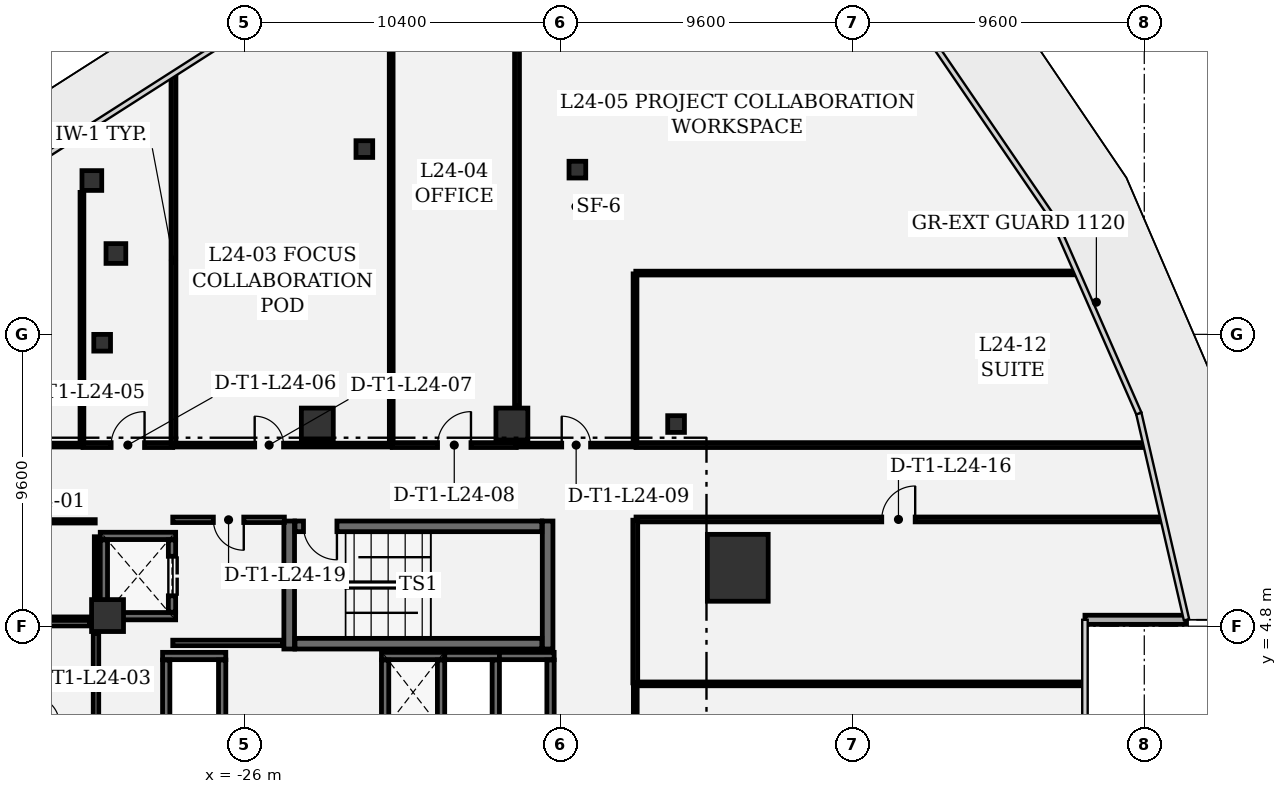
"""IFC4 building model, lengths in metres.
Left out: names, types, materials, properties, quantities, classifications, styles, units other than length and angle.
Written with IfcOpenShell. Run it as: python <this file> out.ifc"""

import sys

from ifc_helpers import new_model, si_unit, direction, frame, frame_2d, origin, origin_2d, place, context, subcontext, project, spatial, rectangle, extrude, element, fill, save


model = new_model("IFC4")
c1 = context("Model", 3, precision=1e-05, world=origin(), true_north=direction((0.0, 1.0)))
c2 = subcontext(c1, "Body", "Model", "MODEL_VIEW")
j1 = project(units=[si_unit("LENGTHUNIT", "METRE"), si_unit("PLANEANGLEUNIT", "RADIAN")], contexts=[c1])
p1 = place(None, origin())
s1 = spatial("IfcSite", under=j1, at=p1, CompositionType="ELEMENT")
p2 = place(p1, origin())
s2 = spatial("IfcBuilding", under=s1, at=p2, CompositionType="ELEMENT")
p3 = place(p2, frame((0.0, 0.0, 109.8)))
s3 = spatial("IfcBuildingStorey", under=s2, at=p3, CompositionType="ELEMENT", Elevation=109.8)
p4 = place(p3, frame((-9.77, 6.721, 0.0), z_axis=(0.0, 0.0, 1.0), x_axis=(1.0, 0.0, 0.0)))
e1 = element("IfcColumn", 1, at=p4, inside=s3, PredefinedType="COLUMN", context=c2, shape_type="SweptSolid", body=[
    extrude(rectangle(XDim=2.0, YDim=2.2, at=origin_2d()), origin(), (0.0, 0.0, 1.0), 4.05),
])
for number, where, z_axis, x_axis in (
    (2, (-23.6, 11.45, 0.0), (0.0, 0.0, 1.0), (1.0, 0.0, 0.0)),
    (3, (-17.2, 11.45, 0.0), (0.0, 0.0, 1.0), (1.0, 0.0, 0.0)),
    (4, (-30.5, 5.15, 0.0), (0.0, 0.0, 1.0), (1.0, 0.0, 0.0)),
):
    element("IfcColumn", number, at=place(p3, frame(where, z_axis=z_axis, x_axis=x_axis)), inside=s3, PredefinedType="COLUMN", context=c2, shape_type="SweptSolid", body=[
        extrude(rectangle(XDim=1.05, YDim=1.05, at=origin_2d()), origin(), (0.0, 0.0, 1.0), 4.05),
    ])
for number, where, z_axis, x_axis in (
    (5, (-31.016, 19.46, 0.0), (0.0, 0.0, 1.0), (1.0, 0.0, 0.0)),
    (6, (-30.225, 17.06, 0.0), (0.0, 0.0, 1.0), (1.0, 0.0, 0.0)),
):
    element("IfcColumn", number, at=place(p3, frame(where, z_axis=z_axis, x_axis=x_axis)), inside=s3, PredefinedType="COLUMN", context=c2, shape_type="SweptSolid", body=[
        extrude(rectangle(XDim=0.65, YDim=0.65, at=origin_2d()), origin(), (0.0, 0.0, 1.0), 4.05),
    ])
for number, where, z_axis, x_axis in (
    (7, (-22.053, 20.495, 0.0), (0.0, 0.0, 1.0), (1.0, 0.0, 0.0)),
    (8, (-30.677, 14.124, 0.0), (0.0, 0.0, 1.0), (1.0, 0.0, 0.0)),
    (9, (-15.046, 19.818, 0.0), (0.0, 0.0, 1.0), (1.0, 0.0, 0.0)),
    (10, (-11.8, 11.45, 0.0), (0.0, 0.0, 1.0), (1.0, 0.0, 0.0)),
):
    element("IfcColumn", number, at=place(p3, frame(where, z_axis=z_axis, x_axis=x_axis)), inside=s3, PredefinedType="COLUMN", context=c2, shape_type="SweptSolid", body=[
        extrude(rectangle(XDim=0.55, YDim=0.55, at=origin_2d()), origin(), (0.0, 0.0, 1.0), 4.05),
    ])
p5 = place(p3, frame((1.649, 5.011, 0.0), z_axis=(0.0, 0.0, 1.0), x_axis=(1.0, 0.0, 0.0)))
e11 = element("IfcWall", 11, at=p5, inside=s3, PredefinedType="SOLIDWALL", context=c2, shape_type="SweptSolid", body=[
    extrude(rectangle(XDim=3.341, YDim=0.3, at=frame_2d((1.67, 0.0))), origin(), (0.0, 0.0, 1.0), 3.77),
])
for number, where, z_axis, x_axis in (
    (12, (-24.525, 8.26, 0.0), (0.0, 0.0, 1.0), (0.0, -1.0, 0.0)),
    (13, (-16.025, 4.05, 0.0), (0.0, 0.0, 1.0), (0.0, 1.0, 0.0)),
):
    element("IfcWall", number, at=place(p3, frame(where, z_axis=z_axis, x_axis=x_axis)), inside=s3, PredefinedType="SHEAR", context=c2, shape_type="SweptSolid", body=[
        extrude(rectangle(XDim=4.21, YDim=0.35, at=frame_2d((2.105, 0.0))), origin(), (0.0, 0.0, 1.0), 3.77),
    ])
p6 = place(p3, frame((-24.335, 4.225, 0.0), z_axis=(0.0, 0.0, 1.0), x_axis=(1.0, 0.0, 0.0)))
e14 = element("IfcWall", 14, at=p6, inside=s3, PredefinedType="SHEAR", context=c2, shape_type="SweptSolid", body=[
    extrude(rectangle(XDim=8.12, YDim=0.35, at=frame_2d((4.06, 0.0))), origin(), (0.0, 0.0, 1.0), 3.77),
])
p7 = place(p3, frame((-16.215, 8.085, 0.0), z_axis=(0.0, 0.0, 1.0), x_axis=(-1.0, 0.0, 0.0)))
e15 = element("IfcWall", 15, at=p7, inside=s3, PredefinedType="SHEAR", context=c2, shape_type="SweptSolid", body=[
    extrude(rectangle(XDim=8.12, YDim=0.35, at=frame_2d((4.06, 0.0))), origin(), (0.0, 0.0, 1.0), 3.77),
])
p8 = place(p7, frame((6.74, 0.0, 0.0)))
e16 = element("IfcOpeningElement", 16, at=p8, cuts=e15, PredefinedType="OPENING", context=c2, shape_type="SweptSolid", body=[
    extrude(rectangle(XDim=1.1, YDim=2.2, at=frame_2d((0.55, 1.1))), frame((0.0, 0.185, 0.0), z_axis=(0.0, -1.0, 0.0), x_axis=(1.0, 0.0, 0.0)), (0.0, 0.0, 1.0), 0.37),
])
for number, where, z_axis, x_axis in (
    (17, (-28.26, 5.13, 0.0), (0.0, 0.0, 1.0), (-1.0, 0.0, 0.0)),
    (18, (-30.74, 7.77, 0.0), (0.0, 0.0, 1.0), (1.0, 0.0, 0.0)),
):
    element("IfcWall", number, at=place(p3, frame(where, z_axis=z_axis, x_axis=x_axis)), inside=s3, PredefinedType="SHEAR", context=c2, shape_type="SweptSolid", body=[
        extrude(rectangle(XDim=2.48, YDim=0.24, at=frame_2d((1.24, 0.0))), origin(), (0.0, 0.0, 1.0), 3.77),
    ])
p9 = place(p3, frame((-30.62, 5.262, 0.0), z_axis=(0.0, 0.0, 1.0), x_axis=(0.0, 1.0, 0.0)))
e19 = element("IfcWall", 19, at=p9, inside=s3, PredefinedType="SHEAR", context=c2, shape_type="SweptSolid", body=[
    extrude(rectangle(XDim=2.376, YDim=0.24, at=frame_2d((1.188, 0.0))), origin(), (0.0, 0.0, 1.0), 3.77),
])
p10 = place(p3, frame((-28.38, 7.638, 0.0), z_axis=(0.0, 0.0, 1.0), x_axis=(0.0, -1.0, 0.0)))
e20 = element("IfcWall", 20, at=p10, inside=s3, PredefinedType="SHEAR", context=c2, shape_type="SweptSolid", body=[
    extrude(rectangle(XDim=2.376, YDim=0.24, at=frame_2d((1.188, 0.0))), origin(), (0.0, 0.0, 1.0), 3.77),
])
p11 = place(p10, frame((0.538, 0.0, 0.0)))
e21 = element("IfcOpeningElement", 21, at=p11, cuts=e20, PredefinedType="OPENING", context=c2, shape_type="SweptSolid", body=[
    extrude(rectangle(XDim=1.3, YDim=2.3, at=frame_2d((0.65, 1.15))), frame((0.0, 0.13, 0.0), z_axis=(0.0, -1.0, 0.0), x_axis=(1.0, 0.0, 0.0)), (0.0, 0.0, 1.0), 0.26),
])
p12 = place(p3, frame((-28.69, 3.82, 0.0), z_axis=(0.0, 0.0, 1.0), x_axis=(1.0, 0.0, 0.0)))
e22 = element("IfcWall", 22, at=p12, inside=s3, PredefinedType="SHEAR", context=c2, shape_type="SweptSolid", body=[
    extrude(rectangle(XDim=2.08, YDim=0.24, at=frame_2d((1.04, 0.0))), origin(), (0.0, 0.0, 1.0), 3.77),
])
for number, where, z_axis, x_axis in (
    (23, (-28.57, 1.562, 0.0), (0.0, 0.0, 1.0), (0.0, 1.0, 0.0)),
    (24, (-26.73, 3.688, 0.0), (0.0, 0.0, 1.0), (0.0, -1.0, 0.0)),
):
    element("IfcWall", number, at=place(p3, frame(where, z_axis=z_axis, x_axis=x_axis)), inside=s3, PredefinedType="SHEAR", context=c2, shape_type="SweptSolid", body=[
        extrude(rectangle(XDim=2.126, YDim=0.24, at=frame_2d((1.063, 0.0))), origin(), (0.0, 0.0, 1.0), 3.77),
    ])
p13 = place(p3, frame((-21.49, 3.82, 0.0), z_axis=(0.0, 0.0, 1.0), x_axis=(1.0, 0.0, 0.0)))
e25 = element("IfcWall", 25, at=p13, inside=s3, PredefinedType="SHEAR", context=c2, shape_type="SweptSolid", body=[
    extrude(rectangle(XDim=2.08, YDim=0.24, at=frame_2d((1.04, 0.0))), origin(), (0.0, 0.0, 1.0), 3.77),
])
for number, where, z_axis, x_axis in (
    (26, (-21.37, 1.562, 0.0), (0.0, 0.0, 1.0), (0.0, 1.0, 0.0)),
    (27, (-19.53, 3.688, 0.0), (0.0, 0.0, 1.0), (0.0, -1.0, 0.0)),
):
    element("IfcWall", number, at=place(p3, frame(where, z_axis=z_axis, x_axis=x_axis)), inside=s3, PredefinedType="SHEAR", context=c2, shape_type="SweptSolid", body=[
        extrude(rectangle(XDim=2.126, YDim=0.24, at=frame_2d((1.063, 0.0))), origin(), (0.0, 0.0, 1.0), 3.77),
    ])
p14 = place(p3, frame((-19.41, 3.82, 0.0), z_axis=(0.0, 0.0, 1.0), x_axis=(1.0, 0.0, 0.0)))
e28 = element("IfcWall", 28, at=p14, inside=s3, PredefinedType="SHEAR", context=c2, shape_type="SweptSolid", body=[
    extrude(rectangle(XDim=1.8, YDim=0.24, at=frame_2d((0.9, 0.0))), origin(), (0.0, 0.0, 1.0), 3.77),
])
p15 = place(p3, frame((-17.73, 3.688, 0.0), z_axis=(0.0, 0.0, 1.0), x_axis=(0.0, -1.0, 0.0)))
e29 = element("IfcWall", 29, at=p15, inside=s3, PredefinedType="SHEAR", context=c2, shape_type="SweptSolid", body=[
    extrude(rectangle(XDim=2.126, YDim=0.24, at=frame_2d((1.063, 0.0))), origin(), (0.0, 0.0, 1.0), 3.77),
])
p16 = place(p3, frame((-17.61, 3.82, 0.0), z_axis=(0.0, 0.0, 1.0), x_axis=(1.0, 0.0, 0.0)))
e30 = element("IfcWall", 30, at=p16, inside=s3, PredefinedType="SHEAR", context=c2, shape_type="SweptSolid", body=[
    extrude(rectangle(XDim=1.8, YDim=0.24, at=frame_2d((0.9, 0.0))), origin(), (0.0, 0.0, 1.0), 3.77),
])
p17 = place(p3, frame((-15.93, 3.688, 0.0), z_axis=(0.0, 0.0, 1.0), x_axis=(0.0, -1.0, 0.0)))
e31 = element("IfcWall", 31, at=p17, inside=s3, PredefinedType="SHEAR", context=c2, shape_type="SweptSolid", body=[
    extrude(rectangle(XDim=2.126, YDim=0.24, at=frame_2d((1.063, 0.0))), origin(), (0.0, 0.0, 1.0), 3.77),
])
p18 = place(p3, frame((-28.355, 4.25, 0.0), z_axis=(0.0, 0.0, 1.0), x_axis=(1.0, 0.0, 0.0)))
e32 = element("IfcWall", 32, at=p18, inside=s3, PredefinedType="PARTITIONING", context=c2, shape_type="SweptSolid", body=[
    extrude(rectangle(XDim=3.622, YDim=0.18, at=frame_2d((1.811, 0.0))), origin(), (0.0, 0.0, 1.0), 3.77),
])
p19 = place(p3, frame((-24.684, 8.3, 0.0), z_axis=(0.0, 0.0, 1.0), x_axis=(-1.0, 0.0, 0.0)))
e33 = element("IfcWall", 33, at=p19, inside=s3, PredefinedType="PARTITIONING", context=c2, shape_type="SweptSolid", body=[
    extrude(rectangle(XDim=3.671, YDim=0.18, at=frame_2d((1.835, 0.0))), origin(), (0.0, 0.0, 1.0), 3.77),
])
p20 = place(p19, frame((1.335, 0.0, 0.0)))
e34 = element("IfcOpeningElement", 34, at=p20, cuts=e33, PredefinedType="OPENING", context=c2, shape_type="SweptSolid", body=[
    extrude(rectangle(XDim=1.0, YDim=2.15, at=frame_2d((0.5, 1.075))), frame((0.0, 0.1, 0.0), z_axis=(0.0, -1.0, 0.0), x_axis=(1.0, 0.0, 0.0)), (0.0, 0.0, 1.0), 0.2),
])
p21 = place(p3, frame((-34.155, 5.05, 0.0), z_axis=(0.0, 0.0, 1.0), x_axis=(1.0, 0.0, 0.0)))
e35 = element("IfcWall", 35, at=p21, inside=s3, PredefinedType="PARTITIONING", context=c2, shape_type="SweptSolid", body=[
    extrude(rectangle(XDim=3.065, YDim=0.11, at=frame_2d((1.532, 0.0))), origin(), (0.0, 0.0, 1.0), 3.77),
])
p22 = place(p3, frame((-30.88, 5.74, 0.0), z_axis=(0.0, 0.0, 1.0), x_axis=(0.0, 1.0, 0.0)))
e36 = element("IfcWall", 36, at=p22, inside=s3, PredefinedType="PARTITIONING", context=c2, shape_type="SweptSolid", body=[
    extrude(rectangle(XDim=2.003, YDim=0.11, at=frame_2d((1.001, 0.0))), origin(), (0.0, 0.0, 1.0), 3.77),
])
p23 = place(p3, frame((-30.905, 8.25, 0.0), z_axis=(0.0, 0.0, 1.0), x_axis=(-1.0, 0.0, 0.0)))
e37 = element("IfcWall", 37, at=p23, inside=s3, PredefinedType="PARTITIONING", context=c2, shape_type="SweptSolid", body=[
    extrude(rectangle(XDim=3.25, YDim=0.11, at=frame_2d((1.625, 0.0))), origin(), (0.0, 0.0, 1.0), 3.77),
])
p24 = place(p3, frame((-30.88, 1.625, 0.0), z_axis=(0.0, 0.0, 1.0), x_axis=(0.0, 1.0, 0.0)))
e38 = element("IfcWall", 38, at=p24, inside=s3, PredefinedType="PARTITIONING", context=c2, shape_type="SweptSolid", body=[
    extrude(rectangle(XDim=2.935, YDim=0.18, at=frame_2d((1.468, 0.0))), origin(), (0.0, 0.0, 1.0), 3.77),
])
p25 = place(p3, frame((-31.09, 4.9, 0.0), z_axis=(0.0, 0.0, 1.0), x_axis=(-1.0, 0.0, 0.0)))
e39 = element("IfcWall", 39, at=p25, inside=s3, PredefinedType="PARTITIONING", context=c2, shape_type="SweptSolid", body=[
    extrude(rectangle(XDim=3.065, YDim=0.18, at=frame_2d((1.532, 0.0))), origin(), (0.0, 0.0, 1.0), 3.77),
])
p26 = place(p3, frame((-34.625, 10.758, 0.0), z_axis=(0.0, 0.0, 1.0), x_axis=(1.0, 0.0, 0.0)))
e40 = element("IfcWall", 40, at=p26, inside=s3, PredefinedType="PARTITIONING", context=c2, shape_type="SweptSolid", body=[
    extrude(rectangle(XDim=3.258, YDim=0.125, at=frame_2d((1.629, 0.0))), origin(), (0.0, 0.0, 1.0), 3.334),
])
p27 = place(p26, frame((1.154, 0.0, 0.0)))
e41 = element("IfcOpeningElement", 41, at=p27, cuts=e40, PredefinedType="OPENING", context=c2, shape_type="SweptSolid", body=[
    extrude(rectangle(XDim=0.95, YDim=2.15, at=frame_2d((0.475, 1.075))), frame((0.0, 0.073, 0.0), z_axis=(0.0, -1.0, 0.0), x_axis=(1.0, 0.0, 0.0)), (0.0, 0.0, 1.0), 0.145),
])
p28 = place(p3, frame((-31.342, 10.783, 0.0), z_axis=(0.0, 0.0, 1.0), x_axis=(0.0, 1.0, 0.0)))
e42 = element("IfcWall", 42, at=p28, inside=s3, PredefinedType="PARTITIONING", context=c2, shape_type="SweptSolid", body=[
    extrude(rectangle(XDim=8.287, YDim=0.125, at=frame_2d((4.144, 0.0))), origin(), (0.0, 0.0, 1.0), 3.77),
])
p29 = place(p3, frame((-31.309, 10.758, 0.0), z_axis=(0.0, 0.0, 1.0), x_axis=(1.0, 0.0, 0.0)))
e43 = element("IfcWall", 43, at=p29, inside=s3, PredefinedType="PARTITIONING", context=c2, shape_type="SweptSolid", body=[
    extrude(rectangle(XDim=2.952, YDim=0.16, at=frame_2d((1.476, 0.0))), origin(), (0.0, 0.0, 1.0), 3.77),
])
p30 = place(p29, frame((0.926, 0.0, 0.0)))
e44 = element("IfcOpeningElement", 44, at=p30, cuts=e43, PredefinedType="OPENING", context=c2, shape_type="SweptSolid", body=[
    extrude(rectangle(XDim=1.1, YDim=2.15, at=frame_2d((0.55, 1.075))), frame((0.0, 0.09, 0.0), z_axis=(0.0, -1.0, 0.0), x_axis=(1.0, 0.0, 0.0)), (0.0, 0.0, 1.0), 0.18),
])
p31 = place(p3, frame((-28.331, 10.783, 0.0), z_axis=(0.0, 0.0, 1.0), x_axis=(0.0, 1.0, 0.0)))
e45 = element("IfcWall", 45, at=p31, inside=s3, PredefinedType="PARTITIONING", context=c2, shape_type="SweptSolid", body=[
    extrude(rectangle(XDim=12.106, YDim=0.16, at=frame_2d((6.053, 0.0))), origin(), (0.0, 0.0, 1.0), 3.334),
])
p32 = place(p3, frame((-28.299, 10.758, 0.0), z_axis=(0.0, 0.0, 1.0), x_axis=(1.0, 0.0, 0.0)))
e46 = element("IfcWall", 46, at=p32, inside=s3, PredefinedType="PARTITIONING", context=c2, shape_type="SweptSolid", body=[
    extrude(rectangle(XDim=7.105, YDim=0.125, at=frame_2d((3.553, 0.0))), origin(), (0.0, 0.0, 1.0), 3.77),
])
p33 = place(p32, frame((2.638, 0.0, 0.0)))
e47 = element("IfcOpeningElement", 47, at=p33, cuts=e46, PredefinedType="OPENING", context=c2, shape_type="SweptSolid", body=[
    extrude(rectangle(XDim=0.95, YDim=2.15, at=frame_2d((0.475, 1.075))), frame((0.0, 0.073, 0.0), z_axis=(0.0, -1.0, 0.0), x_axis=(1.0, 0.0, 0.0)), (0.0, 0.0, 1.0), 0.145),
])
p34 = place(p3, frame((-21.168, 10.783, 0.0), z_axis=(0.0, 0.0, 1.0), x_axis=(-0.000190255964, 0.999999981901, 0.0)))
e48 = element("IfcWall", 48, at=p34, inside=s3, PredefinedType="PARTITIONING", context=c2, shape_type="SweptSolid", body=[
    extrude(rectangle(XDim=16.682, YDim=0.125, at=frame_2d((8.341, 0.0))), origin(), (0.0, 0.0, 1.0), 2.885),
])
p35 = place(p3, frame((-21.135, 10.758, 0.0), z_axis=(0.0, 0.0, 1.0), x_axis=(1.0, 0.0, 0.0)))
e49 = element("IfcWall", 49, at=p35, inside=s3, PredefinedType="PARTITIONING", context=c2, shape_type="SweptSolid", body=[
    extrude(rectangle(XDim=4.079, YDim=0.16, at=frame_2d((2.039, 0.0))), origin(), (0.0, 0.0, 1.0), 3.77),
])
p36 = place(p35, frame((1.489, 0.0, 0.0)))
e50 = element("IfcOpeningElement", 50, at=p36, cuts=e49, PredefinedType="OPENING", context=c2, shape_type="SweptSolid", body=[
    extrude(rectangle(XDim=1.1, YDim=2.15, at=frame_2d((0.55, 1.075))), frame((0.0, 0.09, 0.0), z_axis=(0.0, -1.0, 0.0), x_axis=(1.0, 0.0, 0.0)), (0.0, 0.0, 1.0), 0.18),
])
p37 = place(p3, frame((-17.032, 12.04, 0.0), z_axis=(0.0, 0.0, 1.0), x_axis=(0.0, 1.0, 0.0)))
e51 = element("IfcWall", 51, at=p37, inside=s3, PredefinedType="PARTITIONING", context=c2, shape_type="SweptSolid", body=[
    extrude(rectangle(XDim=14.499, YDim=0.16, at=frame_2d((7.25, 0.0))), origin(), (0.0, 0.0, 1.0), 2.885),
])
p38 = place(p3, frame((-16.999, 10.758, 0.0), z_axis=(0.0, 0.0, 1.0), x_axis=(1.0, 0.0, 0.0)))
e52 = element("IfcWall", 52, at=p38, inside=s3, PredefinedType="PARTITIONING", context=c2, shape_type="SweptSolid", body=[
    extrude(rectangle(XDim=3.824, YDim=0.125, at=frame_2d((1.912, 0.0))), origin(), (0.0, 0.0, 1.0), 2.885),
])
p39 = place(p38, frame((1.437, 0.0, 0.0)))
e53 = element("IfcOpeningElement", 53, at=p39, cuts=e52, PredefinedType="OPENING", context=c2, shape_type="SweptSolid", body=[
    extrude(rectangle(XDim=0.95, YDim=2.15, at=frame_2d((0.475, 1.075))), frame((0.0, 0.073, 0.0), z_axis=(0.0, -1.0, 0.0), x_axis=(1.0, 0.0, 0.0)), (0.0, 0.0, 1.0), 0.145),
])
p40 = place(p3, frame((-13.15, 16.39, 0.0), z_axis=(0.0, 0.0, 1.0), x_axis=(0.0, -1.0, 0.0)))
e54 = element("IfcWall", 54, at=p40, inside=s3, PredefinedType="PARTITIONING", context=c2, shape_type="SweptSolid", body=[
    extrude(rectangle(XDim=5.607, YDim=0.125, at=frame_2d((2.803, 0.0))), origin(), (0.0, 0.0, 1.0), 2.89),
])
p41 = place(p3, frame((-13.125, 16.415, 0.0), z_axis=(0.0, 0.0, 1.0), x_axis=(0.999999910658, 0.000422711402, 0.0)))
e55 = element("IfcWall", 55, at=p41, inside=s3, PredefinedType="PARTITIONING", context=c2, shape_type="SweptSolid", body=[
    extrude(rectangle(XDim=14.439, YDim=0.125, at=frame_2d((7.219, 0.0))), origin(), (0.0, 0.0, 1.0), 3.334),
])
p42 = place(p3, frame((1.569, 2.903, 0.0), z_axis=(0.0, 0.0, 1.0), x_axis=(-1.0, 0.0, 0.0)))
e56 = element("IfcWall", 56, at=p42, inside=s3, PredefinedType="PARTITIONING", context=c2, shape_type="SweptSolid", body=[
    extrude(rectangle(XDim=14.686, YDim=0.125, at=frame_2d((7.343, 0.0))), origin(), (0.0, 0.0, 1.0), 3.77),
])
p43 = place(p3, frame((-13.142, 2.878, 0.0), z_axis=(0.0, 0.0, 1.0), x_axis=(0.0, -1.0, 0.0)))
e57 = element("IfcWall", 57, at=p43, inside=s3, PredefinedType="PARTITIONING", context=c2, shape_type="SweptSolid", body=[
    extrude(rectangle(XDim=11.523, YDim=0.125, at=frame_2d((5.761, 0.0))), origin(), (0.0, 0.0, 1.0), 3.77),
])
p44 = place(p43, frame((5.286, 0.0, 0.0)))
e58 = element("IfcOpeningElement", 58, at=p44, cuts=e57, PredefinedType="OPENING", context=c2, shape_type="SweptSolid", body=[
    extrude(rectangle(XDim=0.95, YDim=2.15, at=frame_2d((0.475, 1.075))), frame((0.0, 0.073, 0.0), z_axis=(0.0, -1.0, 0.0), x_axis=(1.0, 0.0, 0.0)), (0.0, 0.0, 1.0), 0.145),
])
p45 = place(p3, frame((3.581, 10.758, 0.0), z_axis=(0.0, 0.0, 1.0), x_axis=(-1.0, 0.0, 0.0)))
e59 = element("IfcWall", 59, at=p45, inside=s3, PredefinedType="PARTITIONING", context=c2, shape_type="SweptSolid", body=[
    extrude(rectangle(XDim=16.698, YDim=0.16, at=frame_2d((8.349, 0.0))), origin(), (0.0, 0.0, 1.0), 3.77),
])
p46 = place(p3, frame((-13.117, 8.312, 0.0), z_axis=(0.0, 0.0, 1.0), x_axis=(1.0, 0.0, 0.0)))
e60 = element("IfcWall", 60, at=p46, inside=s3, PredefinedType="PARTITIONING", context=c2, shape_type="SweptSolid", body=[
    extrude(rectangle(XDim=17.264, YDim=0.16, at=frame_2d((8.632, 0.0))), origin(), (0.0, 0.0, 1.0), 2.885),
])
p47 = place(p46, frame((8.082, 0.0, 0.0)))
e61 = element("IfcOpeningElement", 61, at=p47, cuts=e60, PredefinedType="OPENING", context=c2, shape_type="SweptSolid", body=[
    extrude(rectangle(XDim=1.1, YDim=2.15, at=frame_2d((0.55, 1.075))), frame((0.0, 0.09, 0.0), z_axis=(0.0, -1.0, 0.0), x_axis=(1.0, 0.0, 0.0)), (0.0, 0.0, 1.0), 0.18),
])
p48 = place(p3, frame((-13.142, 8.287, 0.0), z_axis=(0.0, 0.0, 1.0), x_axis=(0.0, -1.0, 0.0)))
e62 = element("IfcWall", 62, at=p48, inside=s3, PredefinedType="PARTITIONING", context=c2, shape_type="SweptSolid", body=[
    extrude(rectangle(XDim=5.351, YDim=0.16, at=frame_2d((2.676, 0.0))), origin(), (0.0, 0.0, 1.0), 3.77),
])
p49 = place(p8, origin())
e63 = element("IfcDoor", 63, at=p49, inside=s3, OperationType="SINGLE_SWING_LEFT", PredefinedType="DOOR", context=c2, shape_type="SweptSolid", body=[
    extrude(rectangle(XDim=1.1, YDim=2.2, at=frame_2d((0.55, 1.1))), frame((0.0, 0.025, 0.0), z_axis=(0.0, -1.0, 0.0), x_axis=(1.0, 0.0, 0.0)), (0.0, 0.0, 1.0), 0.05),
])
fill(e16, e63)
p50 = place(p11, origin())
e64 = element("IfcDoor", 64, at=p50, inside=s3, OperationType="DOUBLE_DOOR_SLIDING", PredefinedType="DOOR", context=c2, shape_type="SweptSolid", body=[
    extrude(rectangle(XDim=1.3, YDim=2.3, at=frame_2d((0.65, 1.15))), frame((0.0, 0.025, 0.0), z_axis=(0.0, -1.0, 0.0), x_axis=(1.0, 0.0, 0.0)), (0.0, 0.0, 1.0), 0.05),
])
fill(e21, e64)
p51 = place(p30, origin())
e65 = element("IfcDoor", 65, at=p51, inside=s3, OperationType="SINGLE_SWING_RIGHT", PredefinedType="DOOR", context=c2, shape_type="SweptSolid", body=[
    extrude(rectangle(XDim=1.1, YDim=2.15, at=frame_2d((0.55, 1.075))), frame((0.0, 0.025, 0.0), z_axis=(0.0, -1.0, 0.0), x_axis=(1.0, 0.0, 0.0)), (0.0, 0.0, 1.0), 0.05),
])
fill(e44, e65)
p52 = place(p33, origin())
e66 = element("IfcDoor", 66, at=p52, inside=s3, OperationType="SINGLE_SWING_LEFT", PredefinedType="DOOR", context=c2, shape_type="SweptSolid", body=[
    extrude(rectangle(XDim=0.95, YDim=2.15, at=frame_2d((0.475, 1.075))), frame((0.0, 0.025, 0.0), z_axis=(0.0, -1.0, 0.0), x_axis=(1.0, 0.0, 0.0)), (0.0, 0.0, 1.0), 0.05),
])
fill(e47, e66)
p53 = place(p36, origin())
e67 = element("IfcDoor", 67, at=p53, inside=s3, OperationType="SINGLE_SWING_RIGHT", PredefinedType="DOOR", context=c2, shape_type="SweptSolid", body=[
    extrude(rectangle(XDim=1.1, YDim=2.15, at=frame_2d((0.55, 1.075))), frame((0.0, 0.025, 0.0), z_axis=(0.0, -1.0, 0.0), x_axis=(1.0, 0.0, 0.0)), (0.0, 0.0, 1.0), 0.05),
])
fill(e50, e67)
p54 = place(p39, origin())
e68 = element("IfcDoor", 68, at=p54, inside=s3, OperationType="SINGLE_SWING_LEFT", PredefinedType="DOOR", context=c2, shape_type="SweptSolid", body=[
    extrude(rectangle(XDim=0.95, YDim=2.15, at=frame_2d((0.475, 1.075))), frame((0.0, 0.025, 0.0), z_axis=(0.0, -1.0, 0.0), x_axis=(1.0, 0.0, 0.0)), (0.0, 0.0, 1.0), 0.05),
])
fill(e53, e68)
p55 = place(p47, origin())
e69 = element("IfcDoor", 69, at=p55, inside=s3, OperationType="SINGLE_SWING_RIGHT", PredefinedType="DOOR", context=c2, shape_type="SweptSolid", body=[
    extrude(rectangle(XDim=1.1, YDim=2.15, at=frame_2d((0.55, 1.075))), frame((0.0, 0.025, 0.0), z_axis=(0.0, -1.0, 0.0), x_axis=(1.0, 0.0, 0.0)), (0.0, 0.0, 1.0), 0.05),
])
fill(e61, e69)
p56 = place(p20, origin())
e70 = element("IfcDoor", 70, at=p56, inside=s3, OperationType="SINGLE_SWING_LEFT", PredefinedType="DOOR", context=c2, shape_type="SweptSolid", body=[
    extrude(rectangle(XDim=1.0, YDim=2.15, at=frame_2d((0.5, 1.075))), frame((0.0, 0.025, 0.0), z_axis=(0.0, -1.0, 0.0), x_axis=(1.0, 0.0, 0.0)), (0.0, 0.0, 1.0), 0.05),
])
fill(e34, e70)
save(model, sys.argv[1])
